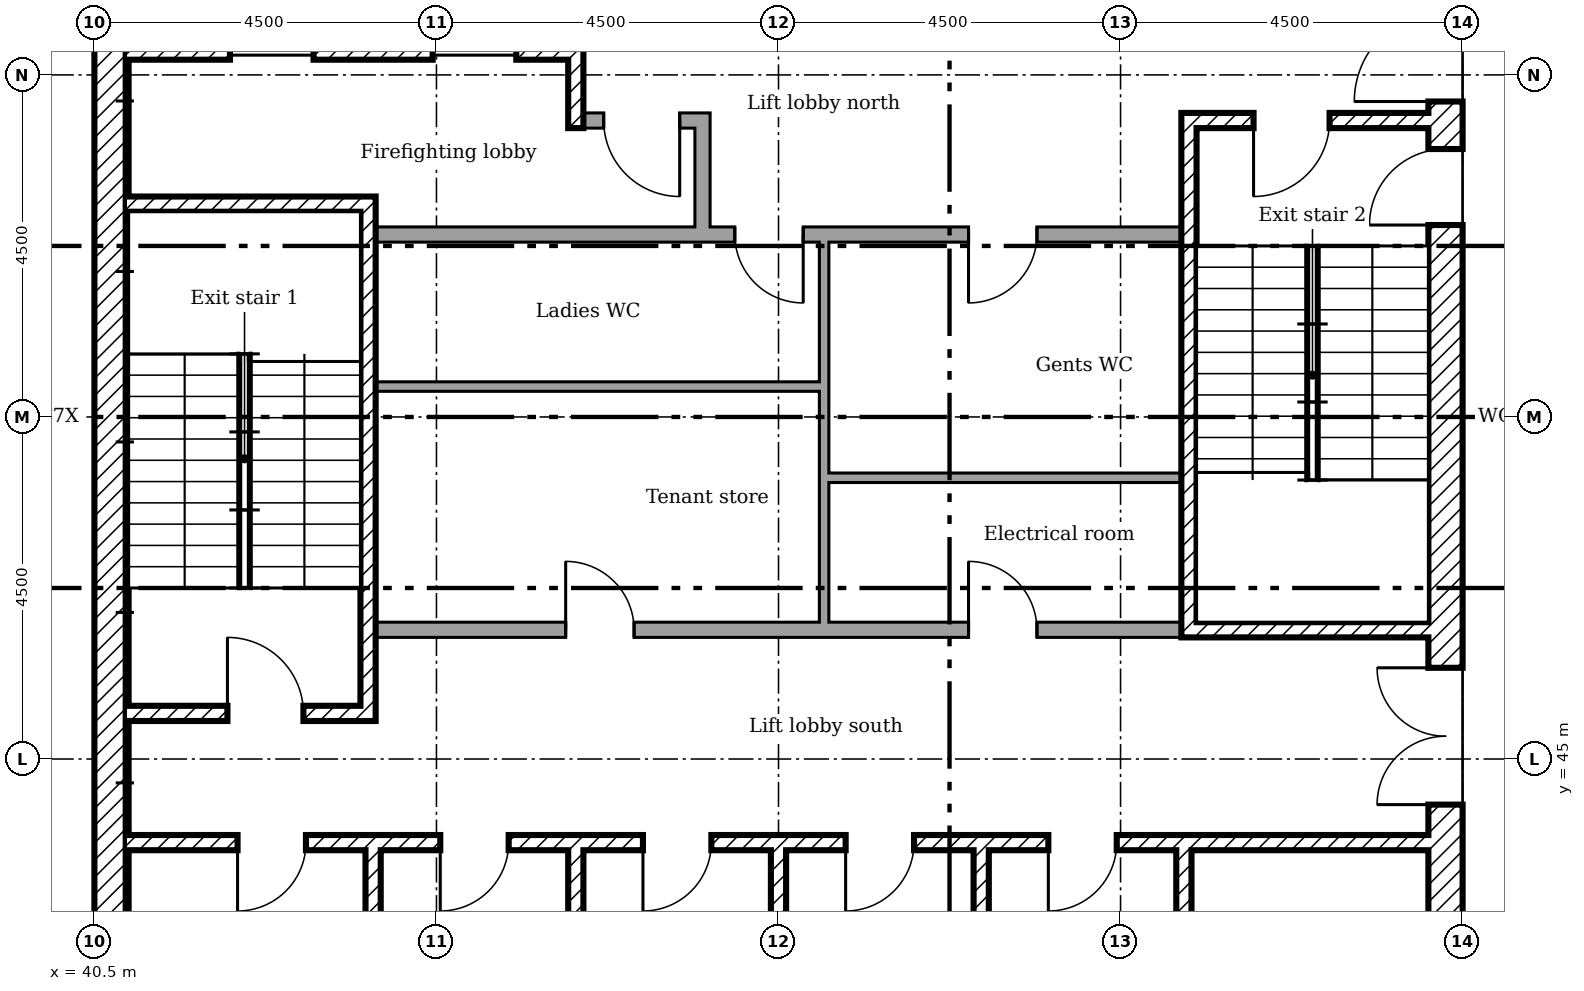
"""IFC4 building model, lengths in metres.
Left out: names, types, materials, properties, quantities, classifications, styles, units other than length and angle.
Written with IfcOpenShell. Run it as: python <this file> out.ifc"""

import sys

from ifc_helpers import new_model, si_unit, direction, frame, frame_2d, origin, place, context, subcontext, project, spatial, rectangle, extrude, element, fill, save


model = new_model("IFC4")
c1 = context("Model", 3, precision=1e-05, world=origin(), true_north=direction((0.0, 1.0)))
c2 = subcontext(c1, "Body", "Model", "MODEL_VIEW")
j1 = project(units=[si_unit("LENGTHUNIT", "METRE"), si_unit("PLANEANGLEUNIT", "RADIAN")], contexts=[c1])
p1 = place(None, origin())
s1 = spatial("IfcSite", under=j1, at=p1, CompositionType="ELEMENT")
p2 = place(p1, origin())
s2 = spatial("IfcBuilding", under=s1, at=p2, CompositionType="ELEMENT")
p3 = place(p2, frame((0.0, 0.0, 251.0)))
s3 = spatial("IfcBuildingStorey", under=s2, at=p3, CompositionType="ELEMENT", Elevation=251.0)
p4 = place(p3, frame((58.275, 40.5, 0.0), z_axis=(0.0, 0.0, 1.0), x_axis=(0.0, 1.0, 0.0)))
e1 = element("IfcWall", 1, at=p4, inside=s3, PredefinedType="SHEAR", context=c2, shape_type="SweptSolid", body=[
    extrude(rectangle(XDim=18.0, YDim=0.45, at=frame_2d((9.0, 0.0))), origin(), (0.0, 0.0, 1.0), 3.78),
])
p5 = place(p4, frame((13.15, 0.0, 0.0)))
e2 = element("IfcOpeningElement", 2, at=p5, cuts=e1, PredefinedType="OPENING", context=c2, shape_type="SweptSolid", body=[
    extrude(rectangle(XDim=1.2, YDim=2.1, at=frame_2d((0.6, 1.05))), frame((0.0, 0.235, 0.0), z_axis=(0.0, -1.0, 0.0), x_axis=(1.0, 0.0, 0.0)), (0.0, 0.0, 1.0), 0.47),
])
p6 = place(p4, frame((3.9, 0.0, 0.0)))
e3 = element("IfcOpeningElement", 3, at=p6, cuts=e1, PredefinedType="OPENING", context=c2, shape_type="SweptSolid", body=[
    extrude(rectangle(XDim=1.8, YDim=2.1, at=frame_2d((0.9, 1.05))), frame((0.0, 0.235, 0.0), z_axis=(0.0, -1.0, 0.0), x_axis=(1.0, 0.0, 0.0)), (0.0, 0.0, 1.0), 0.47),
])
p7 = place(p4, frame((11.525, 0.0, 0.0)))
e4 = element("IfcOpeningElement", 4, at=p7, cuts=e1, PredefinedType="OPENING", context=c2, shape_type="SweptSolid", body=[
    extrude(rectangle(XDim=1.0, YDim=2.1, at=frame_2d((0.5, 1.05))), frame((0.0, 0.235, 0.0), z_axis=(0.0, -1.0, 0.0), x_axis=(1.0, 0.0, 0.0)), (0.0, 0.0, 1.0), 0.47),
])
p8 = place(p3, frame((40.725, 40.95, 0.0), z_axis=(0.0, 0.0, 1.0), x_axis=(0.0, 1.0, 0.0)))
e5 = element("IfcWall", 5, at=p8, inside=s3, PredefinedType="SHEAR", context=c2, shape_type="SweptSolid", body=[
    extrude(rectangle(XDim=17.1, YDim=0.45, at=frame_2d((8.55, 0.0))), origin(), (0.0, 0.0, 1.0), 3.78),
])
p9 = place(p3, frame((46.833, 58.05, 0.0), z_axis=(0.0, 0.0, 1.0), x_axis=(0.0, -1.0, 0.0)))
e6 = element("IfcWall", 6, at=p9, inside=s3, PredefinedType="SHEAR", context=c2, shape_type="SweptSolid", body=[
    extrude(rectangle(XDim=4.75, YDim=0.2, at=frame_2d((2.375, 0.0))), origin(), (0.0, 0.0, 1.0), 3.78),
])
for number, where, z_axis, x_axis in (
    (7, (44.167, 40.95, 0.0), (0.0, 0.0, 1.0), (0.0, 1.0, 0.0)),
    (8, (46.833, 40.95, 0.0), (0.0, 0.0, 1.0), (0.0, 1.0, 0.0)),
    (9, (49.5, 40.95, 0.0), (0.0, 0.0, 1.0), (0.0, 1.0, 0.0)),
    (10, (52.167, 40.95, 0.0), (0.0, 0.0, 1.0), (0.0, 1.0, 0.0)),
    (11, (54.833, 40.95, 0.0), (0.0, 0.0, 1.0), (0.0, 1.0, 0.0)),
):
    element("IfcWall", number, at=place(p3, frame(where, z_axis=z_axis, x_axis=x_axis)), inside=s3, PredefinedType="SHEAR", context=c2, shape_type="SweptSolid", body=[
        extrude(rectangle(XDim=2.85, YDim=0.2, at=frame_2d((1.425, 0.0))), origin(), (0.0, 0.0, 1.0), 3.78),
    ])
p10 = place(p3, frame((48.5, 51.9, 0.0), z_axis=(0.0, 0.0, 1.0), x_axis=(0.0, 1.0, 0.0)))
e12 = element("IfcWall", 12, at=p10, inside=s3, PredefinedType="PARTITIONING", context=c2, shape_type="SweptSolid", body=[
    extrude(rectangle(XDim=1.6, YDim=0.2, at=frame_2d((0.8, 0.0))), origin(), (0.0, 0.0, 1.0), 3.78),
])
p11 = place(p3, frame((46.933, 53.4, 0.0)))
e13 = element("IfcWall", 13, at=p11, inside=s3, PredefinedType="PARTITIONING", context=c2, shape_type="SweptSolid", body=[
    extrude(rectangle(XDim=1.467, YDim=0.2, at=frame_2d((0.733, 0.0))), origin(), (0.0, 0.0, 1.0), 3.78),
])
p12 = place(p11, frame((0.267, 0.0, 0.0)))
e14 = element("IfcOpeningElement", 14, at=p12, cuts=e13, PredefinedType="OPENING", context=c2, shape_type="SweptSolid", body=[
    extrude(rectangle(XDim=1.0, YDim=2.1, at=frame_2d((0.5, 1.05))), frame((0.0, 0.11, 0.0), z_axis=(0.0, -1.0, 0.0), x_axis=(1.0, 0.0, 0.0)), (0.0, 0.0, 1.0), 0.22),
])
p13 = place(p3, frame((40.95, 54.3, 0.0)))
e15 = element("IfcWall", 15, at=p13, inside=s3, PredefinedType="SHEAR", context=c2, shape_type="SweptSolid", body=[
    extrude(rectangle(XDim=5.783, YDim=0.2, at=frame_2d((2.892, 0.0))), origin(), (0.0, 0.0, 1.0), 3.78),
])
p14 = place(p13, frame((1.333, 0.0, 0.0)))
e16 = element("IfcOpeningElement", 16, at=p14, cuts=e15, PredefinedType="OPENING", context=c2, shape_type="SweptSolid", body=[
    extrude(rectangle(XDim=1.1, YDim=2.1, at=frame_2d((0.55, 1.05))), frame((0.0, 0.11, 0.0), z_axis=(0.0, -1.0, 0.0), x_axis=(1.0, 0.0, 0.0)), (0.0, 0.0, 1.0), 0.22),
])
p15 = place(p13, frame((4.0, 0.0, 0.0)))
e17 = element("IfcOpeningElement", 17, at=p15, cuts=e15, PredefinedType="OPENING", context=c2, shape_type="SweptSolid", body=[
    extrude(rectangle(XDim=1.1, YDim=2.1, at=frame_2d((0.55, 1.05))), frame((0.0, 0.11, 0.0), z_axis=(0.0, -1.0, 0.0), x_axis=(1.0, 0.0, 0.0)), (0.0, 0.0, 1.0), 0.22),
])
p16 = place(p3, frame((40.95, 43.9, 0.0)))
e18 = element("IfcWall", 18, at=p16, inside=s3, PredefinedType="SHEAR", context=c2, shape_type="SweptSolid", body=[
    extrude(rectangle(XDim=17.1, YDim=0.2, at=frame_2d((8.55, 0.0))), origin(), (0.0, 0.0, 1.0), 3.78),
])
p17 = place(p16, frame((1.433, 0.0, 0.0)))
e19 = element("IfcOpeningElement", 19, at=p17, cuts=e18, PredefinedType="OPENING", context=c2, shape_type="SweptSolid", body=[
    extrude(rectangle(XDim=0.9, YDim=2.1, at=frame_2d((0.45, 1.05))), frame((0.0, 0.11, 0.0), z_axis=(0.0, -1.0, 0.0), x_axis=(1.0, 0.0, 0.0)), (0.0, 0.0, 1.0), 0.22),
])
p18 = place(p16, frame((4.1, 0.0, 0.0)))
e20 = element("IfcOpeningElement", 20, at=p18, cuts=e18, PredefinedType="OPENING", context=c2, shape_type="SweptSolid", body=[
    extrude(rectangle(XDim=0.9, YDim=2.1, at=frame_2d((0.45, 1.05))), frame((0.0, 0.11, 0.0), z_axis=(0.0, -1.0, 0.0), x_axis=(1.0, 0.0, 0.0)), (0.0, 0.0, 1.0), 0.22),
])
p19 = place(p16, frame((6.767, 0.0, 0.0)))
e21 = element("IfcOpeningElement", 21, at=p19, cuts=e18, PredefinedType="OPENING", context=c2, shape_type="SweptSolid", body=[
    extrude(rectangle(XDim=0.9, YDim=2.1, at=frame_2d((0.45, 1.05))), frame((0.0, 0.11, 0.0), z_axis=(0.0, -1.0, 0.0), x_axis=(1.0, 0.0, 0.0)), (0.0, 0.0, 1.0), 0.22),
])
p20 = place(p16, frame((9.433, 0.0, 0.0)))
e22 = element("IfcOpeningElement", 22, at=p20, cuts=e18, PredefinedType="OPENING", context=c2, shape_type="SweptSolid", body=[
    extrude(rectangle(XDim=0.9, YDim=2.1, at=frame_2d((0.45, 1.05))), frame((0.0, 0.11, 0.0), z_axis=(0.0, -1.0, 0.0), x_axis=(1.0, 0.0, 0.0)), (0.0, 0.0, 1.0), 0.22),
])
p21 = place(p16, frame((12.1, 0.0, 0.0)))
e23 = element("IfcOpeningElement", 23, at=p21, cuts=e18, PredefinedType="OPENING", context=c2, shape_type="SweptSolid", body=[
    extrude(rectangle(XDim=0.9, YDim=2.1, at=frame_2d((0.45, 1.05))), frame((0.0, 0.11, 0.0), z_axis=(0.0, -1.0, 0.0), x_axis=(1.0, 0.0, 0.0)), (0.0, 0.0, 1.0), 0.22),
])
p22 = place(p3, frame((44.1, 45.5, 0.0), z_axis=(0.0, 0.0, 1.0), x_axis=(0.0, 1.0, 0.0)))
e24 = element("IfcWall", 24, at=p22, inside=s3, PredefinedType="SHEAR", context=c2, shape_type="SweptSolid", body=[
    extrude(rectangle(XDim=6.9, YDim=0.2, at=frame_2d((3.45, 0.0))), origin(), (0.0, 0.0, 1.0), 3.78),
])
p23 = place(p3, frame((40.95, 52.3, 0.0)))
e25 = element("IfcWall", 25, at=p23, inside=s3, PredefinedType="SHEAR", context=c2, shape_type="SweptSolid", body=[
    extrude(rectangle(XDim=3.05, YDim=0.2, at=frame_2d((1.525, 0.0))), origin(), (0.0, 0.0, 1.0), 3.78),
])
p24 = place(p3, frame((40.95, 45.6, 0.0)))
e26 = element("IfcWall", 26, at=p24, inside=s3, PredefinedType="SHEAR", context=c2, shape_type="SweptSolid", body=[
    extrude(rectangle(XDim=3.05, YDim=0.2, at=frame_2d((1.525, 0.0))), origin(), (0.0, 0.0, 1.0), 3.78),
])
p25 = place(p24, frame((1.3, 0.0, 0.0)))
e27 = element("IfcOpeningElement", 27, at=p25, cuts=e26, PredefinedType="OPENING", context=c2, shape_type="SweptSolid", body=[
    extrude(rectangle(XDim=1.0, YDim=2.1, at=frame_2d((0.5, 1.05))), frame((0.0, 0.11, 0.0), z_axis=(0.0, -1.0, 0.0), x_axis=(1.0, 0.0, 0.0)), (0.0, 0.0, 1.0), 0.22),
])
p26 = place(p3, frame((54.8, 53.4, 0.0)))
e28 = element("IfcWall", 28, at=p26, inside=s3, PredefinedType="SHEAR", context=c2, shape_type="SweptSolid", body=[
    extrude(rectangle(XDim=3.25, YDim=0.2, at=frame_2d((1.625, 0.0))), origin(), (0.0, 0.0, 1.0), 3.78),
])
p27 = place(p26, frame((0.95, 0.0, 0.0)))
e29 = element("IfcOpeningElement", 29, at=p27, cuts=e28, PredefinedType="OPENING", context=c2, shape_type="SweptSolid", body=[
    extrude(rectangle(XDim=1.0, YDim=2.1, at=frame_2d((0.5, 1.05))), frame((0.0, 0.11, 0.0), z_axis=(0.0, -1.0, 0.0), x_axis=(1.0, 0.0, 0.0)), (0.0, 0.0, 1.0), 0.22),
])
p28 = place(p3, frame((54.8, 46.7, 0.0)))
e30 = element("IfcWall", 30, at=p28, inside=s3, PredefinedType="SHEAR", context=c2, shape_type="SweptSolid", body=[
    extrude(rectangle(XDim=3.25, YDim=0.2, at=frame_2d((1.625, 0.0))), origin(), (0.0, 0.0, 1.0), 3.78),
])
p29 = place(p3, frame((54.9, 46.8, 0.0), z_axis=(0.0, 0.0, 1.0), x_axis=(0.0, 1.0, 0.0)))
e31 = element("IfcWall", 31, at=p29, inside=s3, PredefinedType="SHEAR", context=c2, shape_type="SweptSolid", body=[
    extrude(rectangle(XDim=6.5, YDim=0.2, at=frame_2d((3.25, 0.0))), origin(), (0.0, 0.0, 1.0), 3.78),
])
p30 = place(p3, frame((44.2, 51.9, 0.0)))
e32 = element("IfcWall", 32, at=p30, inside=s3, PredefinedType="PARTITIONING", context=c2, shape_type="SweptSolid", body=[
    extrude(rectangle(XDim=10.6, YDim=0.2, at=frame_2d((5.3, 0.0))), origin(), (0.0, 0.0, 1.0), 3.78),
])
p31 = place(p30, frame((4.725, 0.0, 0.0)))
e33 = element("IfcOpeningElement", 33, at=p31, cuts=e32, PredefinedType="OPENING", context=c2, shape_type="SweptSolid", body=[
    extrude(rectangle(XDim=0.9, YDim=2.1, at=frame_2d((0.45, 1.05))), frame((0.0, 0.11, 0.0), z_axis=(0.0, -1.0, 0.0), x_axis=(1.0, 0.0, 0.0)), (0.0, 0.0, 1.0), 0.22),
])
p32 = place(p30, frame((7.8, 0.0, 0.0)))
e34 = element("IfcOpeningElement", 34, at=p32, cuts=e32, PredefinedType="OPENING", context=c2, shape_type="SweptSolid", body=[
    extrude(rectangle(XDim=0.9, YDim=2.1, at=frame_2d((0.45, 1.05))), frame((0.0, 0.11, 0.0), z_axis=(0.0, -1.0, 0.0), x_axis=(1.0, 0.0, 0.0)), (0.0, 0.0, 1.0), 0.22),
])
p33 = place(p3, frame((44.2, 46.7, 0.0)))
e35 = element("IfcWall", 35, at=p33, inside=s3, PredefinedType="PARTITIONING", context=c2, shape_type="SweptSolid", body=[
    extrude(rectangle(XDim=10.6, YDim=0.2, at=frame_2d((5.3, 0.0))), origin(), (0.0, 0.0, 1.0), 3.78),
])
p34 = place(p33, frame((2.5, 0.0, 0.0)))
e36 = element("IfcOpeningElement", 36, at=p34, cuts=e35, PredefinedType="OPENING", context=c2, shape_type="SweptSolid", body=[
    extrude(rectangle(XDim=0.9, YDim=2.1, at=frame_2d((0.45, 1.05))), frame((0.0, 0.11, 0.0), z_axis=(0.0, -1.0, 0.0), x_axis=(1.0, 0.0, 0.0)), (0.0, 0.0, 1.0), 0.22),
])
p35 = place(p33, frame((7.8, 0.0, 0.0)))
e37 = element("IfcOpeningElement", 37, at=p35, cuts=e35, PredefinedType="OPENING", context=c2, shape_type="SweptSolid", body=[
    extrude(rectangle(XDim=0.9, YDim=2.1, at=frame_2d((0.45, 1.05))), frame((0.0, 0.11, 0.0), z_axis=(0.0, -1.0, 0.0), x_axis=(1.0, 0.0, 0.0)), (0.0, 0.0, 1.0), 0.22),
])
p36 = place(p3, frame((50.1, 46.8, 0.0), z_axis=(0.0, 0.0, 1.0), x_axis=(0.0, 1.0, 0.0)))
e38 = element("IfcWall", 38, at=p36, inside=s3, PredefinedType="PARTITIONING", context=c2, shape_type="SweptSolid", body=[
    extrude(rectangle(XDim=1.962, YDim=0.125, at=frame_2d((0.981, 0.0))), origin(), (0.0, 0.0, 1.0), 3.78),
])
p37 = place(p3, frame((54.8, 48.7, 0.0), z_axis=(0.0, 0.0, 1.0), x_axis=(-1.0, 0.0, 0.0)))
e39 = element("IfcWall", 39, at=p37, inside=s3, PredefinedType="PARTITIONING", context=c2, shape_type="SweptSolid", body=[
    extrude(rectangle(XDim=4.637, YDim=0.125, at=frame_2d((2.319, 0.0))), origin(), (0.0, 0.0, 1.0), 3.78),
])
p38 = place(p3, frame((50.1, 48.7, 0.0), z_axis=(0.0, 0.0, 1.0), x_axis=(0.0, 1.0, 0.0)))
e40 = element("IfcWall", 40, at=p38, inside=s3, PredefinedType="PARTITIONING", context=c2, shape_type="SweptSolid", body=[
    extrude(rectangle(XDim=1.262, YDim=0.125, at=frame_2d((0.631, 0.0))), origin(), (0.0, 0.0, 1.0), 3.78),
])
p39 = place(p3, frame((50.038, 49.9, 0.0), z_axis=(0.0, 0.0, 1.0), x_axis=(-1.0, 0.0, 0.0)))
e41 = element("IfcWall", 41, at=p39, inside=s3, PredefinedType="PARTITIONING", context=c2, shape_type="SweptSolid", body=[
    extrude(rectangle(XDim=5.838, YDim=0.125, at=frame_2d((2.919, 0.0))), origin(), (0.0, 0.0, 1.0), 3.78),
])
p40 = place(p3, frame((50.1, 49.9, 0.0), z_axis=(0.0, 0.0, 1.0), x_axis=(0.0, 1.0, 0.0)))
e42 = element("IfcWall", 42, at=p40, inside=s3, PredefinedType="PARTITIONING", context=c2, shape_type="SweptSolid", body=[
    extrude(rectangle(XDim=1.9, YDim=0.125, at=frame_2d((0.95, 0.0))), origin(), (0.0, 0.0, 1.0), 3.78),
])
p41 = place(p5, origin())
e43 = element("IfcDoor", 43, at=p41, inside=s3, OperationType="SINGLE_SWING_RIGHT", PredefinedType="DOOR", context=c2, shape_type="SweptSolid", body=[
    extrude(rectangle(XDim=1.2, YDim=2.1, at=frame_2d((0.6, 1.05))), frame((0.0, 0.025, 0.0), z_axis=(0.0, -1.0, 0.0), x_axis=(1.0, 0.0, 0.0)), (0.0, 0.0, 1.0), 0.05),
])
fill(e2, e43)
p42 = place(p6, origin())
e44 = element("IfcDoor", 44, at=p42, inside=s3, OperationType="DOUBLE_DOOR_SINGLE_SWING", PredefinedType="DOOR", context=c2, shape_type="SweptSolid", body=[
    extrude(rectangle(XDim=1.8, YDim=2.1, at=frame_2d((0.9, 1.05))), frame((0.0, 0.025, 0.0), z_axis=(0.0, -1.0, 0.0), x_axis=(1.0, 0.0, 0.0)), (0.0, 0.0, 1.0), 0.05),
])
fill(e3, e44)
p43 = place(p25, origin())
e45 = element("IfcDoor", 45, at=p43, inside=s3, OperationType="SINGLE_SWING_RIGHT", PredefinedType="DOOR", context=c2, shape_type="SweptSolid", body=[
    extrude(rectangle(XDim=1.0, YDim=2.1, at=frame_2d((0.5, 1.05))), frame((0.0, 0.025, 0.0), z_axis=(0.0, -1.0, 0.0), x_axis=(1.0, 0.0, 0.0)), (0.0, 0.0, 1.0), 0.05),
])
fill(e27, e45)
p44 = place(p27, frame((1.0, 0.0, 0.0), x_axis=(-1.0, 0.0, 0.0)))
e46 = element("IfcDoor", 46, at=p44, inside=s3, OperationType="SINGLE_SWING_LEFT", PredefinedType="DOOR", context=c2, shape_type="SweptSolid", body=[
    extrude(rectangle(XDim=1.0, YDim=2.1, at=frame_2d((0.5, 1.05))), frame((0.0, 0.025, 0.0), z_axis=(0.0, -1.0, 0.0), x_axis=(1.0, 0.0, 0.0)), (0.0, 0.0, 1.0), 0.05),
])
fill(e29, e46)
p45 = place(p7, origin())
e47 = element("IfcDoor", 47, at=p45, inside=s3, OperationType="SINGLE_SWING_RIGHT", PredefinedType="DOOR", context=c2, shape_type="SweptSolid", body=[
    extrude(rectangle(XDim=1.0, YDim=2.1, at=frame_2d((0.5, 1.05))), frame((0.0, 0.025, 0.0), z_axis=(0.0, -1.0, 0.0), x_axis=(1.0, 0.0, 0.0)), (0.0, 0.0, 1.0), 0.05),
])
fill(e4, e47)
p46 = place(p12, frame((1.0, 0.0, 0.0), x_axis=(-1.0, 0.0, 0.0)))
e48 = element("IfcDoor", 48, at=p46, inside=s3, OperationType="SINGLE_SWING_RIGHT", PredefinedType="DOOR", context=c2, shape_type="SweptSolid", body=[
    extrude(rectangle(XDim=1.0, YDim=2.1, at=frame_2d((0.5, 1.05))), frame((0.0, 0.025, 0.0), z_axis=(0.0, -1.0, 0.0), x_axis=(1.0, 0.0, 0.0)), (0.0, 0.0, 1.0), 0.05),
])
fill(e14, e48)
p47 = place(p17, frame((0.9, 0.0, 0.0), x_axis=(-1.0, 0.0, 0.0)))
e49 = element("IfcDoor", 49, at=p47, inside=s3, OperationType="SINGLE_SWING_LEFT", PredefinedType="DOOR", context=c2, shape_type="SweptSolid", body=[
    extrude(rectangle(XDim=0.9, YDim=2.1, at=frame_2d((0.45, 1.05))), frame((0.0, 0.025, 0.0), z_axis=(0.0, -1.0, 0.0), x_axis=(1.0, 0.0, 0.0)), (0.0, 0.0, 1.0), 0.05),
])
fill(e19, e49)
p48 = place(p18, frame((0.9, 0.0, 0.0), x_axis=(-1.0, 0.0, 0.0)))
e50 = element("IfcDoor", 50, at=p48, inside=s3, OperationType="SINGLE_SWING_LEFT", PredefinedType="DOOR", context=c2, shape_type="SweptSolid", body=[
    extrude(rectangle(XDim=0.9, YDim=2.1, at=frame_2d((0.45, 1.05))), frame((0.0, 0.025, 0.0), z_axis=(0.0, -1.0, 0.0), x_axis=(1.0, 0.0, 0.0)), (0.0, 0.0, 1.0), 0.05),
])
fill(e20, e50)
p49 = place(p19, frame((0.9, 0.0, 0.0), x_axis=(-1.0, 0.0, 0.0)))
e51 = element("IfcDoor", 51, at=p49, inside=s3, OperationType="SINGLE_SWING_LEFT", PredefinedType="DOOR", context=c2, shape_type="SweptSolid", body=[
    extrude(rectangle(XDim=0.9, YDim=2.1, at=frame_2d((0.45, 1.05))), frame((0.0, 0.025, 0.0), z_axis=(0.0, -1.0, 0.0), x_axis=(1.0, 0.0, 0.0)), (0.0, 0.0, 1.0), 0.05),
])
fill(e21, e51)
p50 = place(p20, frame((0.9, 0.0, 0.0), x_axis=(-1.0, 0.0, 0.0)))
e52 = element("IfcDoor", 52, at=p50, inside=s3, OperationType="SINGLE_SWING_LEFT", PredefinedType="DOOR", context=c2, shape_type="SweptSolid", body=[
    extrude(rectangle(XDim=0.9, YDim=2.1, at=frame_2d((0.45, 1.05))), frame((0.0, 0.025, 0.0), z_axis=(0.0, -1.0, 0.0), x_axis=(1.0, 0.0, 0.0)), (0.0, 0.0, 1.0), 0.05),
])
fill(e22, e52)
p51 = place(p21, frame((0.9, 0.0, 0.0), x_axis=(-1.0, 0.0, 0.0)))
e53 = element("IfcDoor", 53, at=p51, inside=s3, OperationType="SINGLE_SWING_LEFT", PredefinedType="DOOR", context=c2, shape_type="SweptSolid", body=[
    extrude(rectangle(XDim=0.9, YDim=2.1, at=frame_2d((0.45, 1.05))), frame((0.0, 0.025, 0.0), z_axis=(0.0, -1.0, 0.0), x_axis=(1.0, 0.0, 0.0)), (0.0, 0.0, 1.0), 0.05),
])
fill(e23, e53)
p52 = place(p34, origin())
e54 = element("IfcDoor", 54, at=p52, inside=s3, OperationType="SINGLE_SWING_RIGHT", PredefinedType="DOOR", context=c2, shape_type="SweptSolid", body=[
    extrude(rectangle(XDim=0.9, YDim=2.1, at=frame_2d((0.45, 1.05))), frame((0.0, 0.025, 0.0), z_axis=(0.0, -1.0, 0.0), x_axis=(1.0, 0.0, 0.0)), (0.0, 0.0, 1.0), 0.05),
])
fill(e36, e54)
p53 = place(p31, frame((0.9, 0.0, 0.0), x_axis=(-1.0, 0.0, 0.0)))
e55 = element("IfcDoor", 55, at=p53, inside=s3, OperationType="SINGLE_SWING_RIGHT", PredefinedType="DOOR", context=c2, shape_type="SweptSolid", body=[
    extrude(rectangle(XDim=0.9, YDim=2.1, at=frame_2d((0.45, 1.05))), frame((0.0, 0.025, 0.0), z_axis=(0.0, -1.0, 0.0), x_axis=(1.0, 0.0, 0.0)), (0.0, 0.0, 1.0), 0.05),
])
fill(e33, e55)
p54 = place(p35, origin())
e56 = element("IfcDoor", 56, at=p54, inside=s3, OperationType="SINGLE_SWING_RIGHT", PredefinedType="DOOR", context=c2, shape_type="SweptSolid", body=[
    extrude(rectangle(XDim=0.9, YDim=2.1, at=frame_2d((0.45, 1.05))), frame((0.0, 0.025, 0.0), z_axis=(0.0, -1.0, 0.0), x_axis=(1.0, 0.0, 0.0)), (0.0, 0.0, 1.0), 0.05),
])
fill(e37, e56)
p55 = place(p32, frame((0.9, 0.0, 0.0), x_axis=(-1.0, 0.0, 0.0)))
e57 = element("IfcDoor", 57, at=p55, inside=s3, OperationType="SINGLE_SWING_LEFT", PredefinedType="DOOR", context=c2, shape_type="SweptSolid", body=[
    extrude(rectangle(XDim=0.9, YDim=2.1, at=frame_2d((0.45, 1.05))), frame((0.0, 0.025, 0.0), z_axis=(0.0, -1.0, 0.0), x_axis=(1.0, 0.0, 0.0)), (0.0, 0.0, 1.0), 0.05),
])
fill(e34, e57)
p56 = place(p14, origin())
e58 = element("IfcDoor", 58, at=p56, inside=s3, OperationType="SLIDING_TO_LEFT", PredefinedType="DOOR", context=c2, shape_type="SweptSolid", body=[
    extrude(rectangle(XDim=1.1, YDim=2.1, at=frame_2d((0.55, 1.05))), frame((0.0, 0.025, 0.0), z_axis=(0.0, -1.0, 0.0), x_axis=(1.0, 0.0, 0.0)), (0.0, 0.0, 1.0), 0.05),
])
fill(e16, e58)
p57 = place(p15, origin())
e59 = element("IfcDoor", 59, at=p57, inside=s3, OperationType="SLIDING_TO_LEFT", PredefinedType="DOOR", context=c2, shape_type="SweptSolid", body=[
    extrude(rectangle(XDim=1.1, YDim=2.1, at=frame_2d((0.55, 1.05))), frame((0.0, 0.025, 0.0), z_axis=(0.0, -1.0, 0.0), x_axis=(1.0, 0.0, 0.0)), (0.0, 0.0, 1.0), 0.05),
])
fill(e17, e59)
save(model, sys.argv[1])
